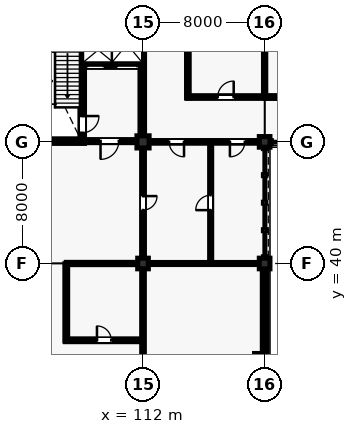
"""IFC4 building model, lengths in metres.
Left out: names, types, materials, properties, quantities, classifications, styles, units other than length and angle.
Written with IfcOpenShell. Run it as: python <this file> out.ifc"""

import sys

from ifc_helpers import new_model, si_unit, direction, frame, frame_2d, origin, origin_2d, place, context, subcontext, project, spatial, rectangle, extrude, element, fill, save


model = new_model("IFC4")
c1 = context("Model", 3, precision=1e-05, world=origin(), true_north=direction((0.0, 1.0)))
c2 = subcontext(c1, "Body", "Model", "MODEL_VIEW")
j1 = project(units=[si_unit("LENGTHUNIT", "METRE"), si_unit("PLANEANGLEUNIT", "RADIAN")], contexts=[c1])
p1 = place(None, origin())
s1 = spatial("IfcSite", under=j1, at=p1, CompositionType="ELEMENT")
p2 = place(p1, origin())
s2 = spatial("IfcBuilding", under=s1, at=p2, CompositionType="ELEMENT")
p3 = place(p2, origin())
s3 = spatial("IfcBuildingStorey", under=s2, at=p3, CompositionType="ELEMENT", Elevation=0.0)
p4 = place(p3, frame((112.0, 40.0, 0.0), z_axis=(0.0, 0.0, 1.0), x_axis=(1.0, 0.0, 0.0)))
e1 = element("IfcColumn", 1, at=p4, inside=s3, PredefinedType="COLUMN", context=c2, shape_type="SweptSolid", body=[
    extrude(rectangle(XDim=0.7, YDim=0.7, at=origin_2d()), origin(), (0.0, 0.0, 1.0), 5.28),
])
p5 = place(p3, frame((112.0, 48.0, 0.0), z_axis=(0.0, 0.0, 1.0), x_axis=(1.0, 0.0, 0.0)))
e2 = element("IfcColumn", 2, at=p5, inside=s3, PredefinedType="COLUMN", context=c2, shape_type="SweptSolid", body=[
    extrude(rectangle(XDim=0.8, YDim=0.8, at=origin_2d()), origin(), (0.0, 0.0, 1.0), 5.28),
])
for number, where, z_axis, x_axis in (
    (3, (120.0, 40.0, 0.0), (0.0, 0.0, 1.0), (1.0, 0.0, 0.0)),
    (4, (120.0, 48.0, 0.0), (0.0, 0.0, 1.0), (1.0, 0.0, 0.0)),
):
    element("IfcColumn", number, at=place(p3, frame(where, z_axis=z_axis, x_axis=x_axis)), inside=s3, PredefinedType="COLUMN", context=c2, shape_type="SweptSolid", body=[
        extrude(rectangle(XDim=0.7, YDim=0.7, at=origin_2d()), origin(), (0.0, 0.0, 1.0), 5.28),
    ])
p6 = place(p3, frame((119.636, 33.779, 0.0), z_axis=(0.0, 0.0, 1.0), x_axis=(1.0, 0.0, 0.0)))
e5 = element("IfcColumn", 5, at=p6, inside=s3, PredefinedType="COLUMN", context=c2, shape_type="SweptSolid", body=[
    extrude(rectangle(XDim=0.6, YDim=0.6, at=origin_2d()), origin(), (0.0, 0.0, 1.0), 5.28),
])
p7 = place(p3, frame((120.0, 33.854, 0.0), z_axis=(0.0, 0.0, 1.0), x_axis=(0.0, 1.0, 0.0)))
e6 = element("IfcWall", 6, at=p7, inside=s3, PredefinedType="SOLIDWALL", context=c2, shape_type="SweptSolid", body=[
    extrude(rectangle(XDim=5.811, YDim=0.305, at=frame_2d((2.905, 0.0))), origin(), (0.0, 0.0, 1.0), 5.035),
])
p8 = place(p7, frame((1.98, 0.0, 0.9)))
e7 = element("IfcOpeningElement", 7, at=p8, cuts=e6, PredefinedType="OPENING", context=c2, shape_type="SweptSolid", body=[
    extrude(rectangle(XDim=1.85, YDim=2.65, at=frame_2d((0.925, 1.325))), frame((0.0, 0.162, 0.0), z_axis=(0.0, -1.0, 0.0), x_axis=(1.0, 0.0, 0.0)), (0.0, 0.0, 1.0), 0.325),
])
p9 = place(p3, frame((111.95, 48.29, 0.0), z_axis=(0.0, 0.0, 1.0), x_axis=(0.0, 1.0, 0.0)))
e8 = element("IfcWall", 8, at=p9, inside=s3, PredefinedType="SHEAR", context=c2, shape_type="SweptSolid", body=[
    extrude(rectangle(XDim=7.42, YDim=0.3, at=frame_2d((3.71, 0.0))), origin(), (0.0, 0.0, 1.0), 5.035),
])
p10 = place(p3, frame((104.315, 48.05, 0.0), z_axis=(0.0, 0.0, 1.0), x_axis=(1.0, 0.0, 0.0)))
e9 = element("IfcWall", 9, at=p10, inside=s3, PredefinedType="SHEAR", context=c2, shape_type="SweptSolid", body=[
    extrude(rectangle(XDim=3.835, YDim=0.3, at=frame_2d((1.917, 0.0))), origin(), (0.0, 0.0, 1.0), 5.035),
])
p11 = place(p3, frame((108.0, 48.05, 0.0), z_axis=(0.0, 0.0, 1.0), x_axis=(0.0, 1.0, 0.0)))
e10 = element("IfcWall", 10, at=p11, inside=s3, PredefinedType="SHEAR", context=c2, shape_type="SweptSolid", body=[
    extrude(rectangle(XDim=7.9, YDim=0.3, at=frame_2d((3.95, 0.0))), origin(), (0.0, 0.0, 1.0), 5.035),
])
p12 = place(p11, frame((0.55, 0.0, 0.0)))
e11 = element("IfcOpeningElement", 11, at=p12, cuts=e10, PredefinedType="OPENING", context=c2, shape_type="SweptSolid", body=[
    extrude(rectangle(XDim=1.1, YDim=2.15, at=frame_2d((0.55, 1.075))), frame((0.0, 0.16, 0.0), z_axis=(0.0, -1.0, 0.0), x_axis=(1.0, 0.0, 0.0)), (0.0, 0.0, 1.0), 0.32),
])
p13 = place(p3, frame((108.0, 53.05, 0.0), z_axis=(0.0, 0.0, 1.0), x_axis=(1.0, 0.0, 0.0)))
e12 = element("IfcWall", 12, at=p13, inside=s3, PredefinedType="SHEAR", context=c2, shape_type="SweptSolid", body=[
    extrude(rectangle(XDim=3.95, YDim=0.3, at=frame_2d((1.975, 0.0))), origin(), (0.0, 0.0, 1.0), 5.035),
])
p14 = place(p13, frame((0.32, 0.0, 0.0)))
e13 = element("IfcOpeningElement", 13, at=p14, cuts=e12, PredefinedType="OPENING", context=c2, shape_type="SweptSolid", body=[
    extrude(rectangle(XDim=1.1, YDim=2.2, at=frame_2d((0.55, 1.1))), frame((0.0, 0.16, 0.0), z_axis=(0.0, -1.0, 0.0), x_axis=(1.0, 0.0, 0.0)), (0.0, 0.0, 1.0), 0.32),
])
p15 = place(p13, frame((2.28, 0.0, 0.0)))
e14 = element("IfcOpeningElement", 14, at=p15, cuts=e12, PredefinedType="OPENING", context=c2, shape_type="SweptSolid", body=[
    extrude(rectangle(XDim=1.35, YDim=2.3, at=frame_2d((0.675, 1.15))), frame((0.0, 0.16, 0.0), z_axis=(0.0, -1.0, 0.0), x_axis=(1.0, 0.0, 0.0)), (0.0, 0.0, 1.0), 0.32),
])
p16 = place(p3, frame((109.98, 53.05, 0.0), z_axis=(0.0, 0.0, 1.0), x_axis=(0.0, 1.0, 0.0)))
e15 = element("IfcWall", 15, at=p16, inside=s3, PredefinedType="SHEAR", context=c2, shape_type="SweptSolid", body=[
    extrude(rectangle(XDim=2.9, YDim=0.3, at=frame_2d((1.45, 0.0))), origin(), (0.0, 0.0, 1.0), 5.035),
])
p17 = place(p3, frame((108.0, 48.05, 0.0), z_axis=(0.0, 0.0, 1.0), x_axis=(1.0, 0.0, 0.0)))
e16 = element("IfcWall", 16, at=p17, inside=s3, PredefinedType="PARTITIONING", context=c2, shape_type="SweptSolid", body=[
    extrude(rectangle(XDim=3.61, YDim=0.2, at=frame_2d((1.805, 0.0))), origin(), (0.0, 0.0, 1.0), 4.404),
])
p18 = place(p17, frame((1.205, 0.0, 0.0)))
e17 = element("IfcOpeningElement", 17, at=p18, cuts=e16, PredefinedType="OPENING", context=c2, shape_type="SweptSolid", body=[
    extrude(rectangle(XDim=1.2, YDim=2.15, at=frame_2d((0.6, 1.075))), frame((0.0, 0.11, 0.0), z_axis=(0.0, -1.0, 0.0), x_axis=(1.0, 0.0, 0.0)), (0.0, 0.0, 1.0), 0.22),
])
p19 = place(p3, frame((106.9, 34.95, 0.0), z_axis=(0.0, 0.0, 1.0), x_axis=(1.0, 0.0, 0.0)))
e18 = element("IfcWall", 18, at=p19, inside=s3, PredefinedType="PARTITIONING", context=c2, shape_type="SweptSolid", body=[
    extrude(rectangle(XDim=5.08, YDim=0.185, at=frame_2d((2.54, 0.0))), origin(), (0.0, 0.0, 1.0), 4.404),
])
p20 = place(p19, frame((2.07, 0.0, 0.0)))
e19 = element("IfcOpeningElement", 19, at=p20, cuts=e18, PredefinedType="OPENING", context=c2, shape_type="SweptSolid", body=[
    extrude(rectangle(XDim=0.94, YDim=2.12, at=frame_2d((0.47, 1.06))), frame((0.0, 0.103, 0.0), z_axis=(0.0, -1.0, 0.0), x_axis=(1.0, 0.0, 0.0)), (0.0, 0.0, 1.0), 0.205),
])
p21 = place(p3, frame((106.95, 34.9, 0.0), z_axis=(0.0, 0.0, 1.0), x_axis=(0.0, 1.0, 0.0)))
e20 = element("IfcWall", 20, at=p21, inside=s3, PredefinedType="PARTITIONING", context=c2, shape_type="SweptSolid", body=[
    extrude(rectangle(XDim=5.08, YDim=0.185, at=frame_2d((2.54, 0.0))), origin(), (0.0, 0.0, 1.0), 4.336),
])
p22 = place(p3, frame((106.95, 40.0, 0.0), z_axis=(0.0, 0.0, 1.0), x_axis=(1.0, 0.0, 0.0)))
e21 = element("IfcWall", 21, at=p22, inside=s3, PredefinedType="PARTITIONING", context=c2, shape_type="SweptSolid", body=[
    extrude(rectangle(XDim=4.69, YDim=0.15, at=frame_2d((2.345, 0.0))), origin(), (0.0, 0.0, 1.0), 4.336),
])
p23 = place(p3, frame((114.9, 50.95, 0.0), z_axis=(0.0, 0.0, 1.0), x_axis=(1.0, 0.0, 0.0)))
e22 = element("IfcWall", 22, at=p23, inside=s3, PredefinedType="PARTITIONING", context=c2, shape_type="SweptSolid", body=[
    extrude(rectangle(XDim=5.08, YDim=0.175, at=frame_2d((2.54, 0.0))), origin(), (0.0, 0.0, 1.0), 4.412),
])
p24 = place(p23, frame((2.015, 0.0, 0.0)))
e23 = element("IfcOpeningElement", 23, at=p24, cuts=e22, PredefinedType="OPENING", context=c2, shape_type="SweptSolid", body=[
    extrude(rectangle(XDim=1.05, YDim=2.15, at=frame_2d((0.525, 1.075))), frame((0.0, 0.097, 0.0), z_axis=(0.0, -1.0, 0.0), x_axis=(1.0, 0.0, 0.0)), (0.0, 0.0, 1.0), 0.195),
])
p25 = place(p3, frame((114.95, 50.9, 0.0), z_axis=(0.0, 0.0, 1.0), x_axis=(0.0, 1.0, 0.0)))
e24 = element("IfcWall", 24, at=p25, inside=s3, PredefinedType="PARTITIONING", context=c2, shape_type="SweptSolid", body=[
    extrude(rectangle(XDim=5.08, YDim=0.175, at=frame_2d((2.54, 0.0))), origin(), (0.0, 0.0, 1.0), 4.403),
])
p26 = place(p3, frame((120.0, 50.95, 0.0), z_axis=(0.0, 0.0, 1.0), x_axis=(0.0, 1.0, 0.0)))
e25 = element("IfcWall", 25, at=p26, inside=s3, PredefinedType="PARTITIONING", context=c2, shape_type="SweptSolid", body=[
    extrude(rectangle(XDim=4.69, YDim=0.15, at=frame_2d((2.345, 0.0))), origin(), (0.0, 0.0, 1.0), 4.412),
])
p27 = place(p3, frame((120.02, 50.95, 0.0), z_axis=(0.0, 0.0, 1.0), x_axis=(1.0, 0.0, 0.0)))
e26 = element("IfcWall", 26, at=p27, inside=s3, PredefinedType="PARTITIONING", context=c2, shape_type="SweptSolid", body=[
    extrude(rectangle(XDim=7.96, YDim=0.185, at=frame_2d((3.98, 0.0))), origin(), (0.0, 0.0, 1.0), 4.404),
])
p28 = place(p27, frame((3.47, 0.0, 0.0)))
e27 = element("IfcOpeningElement", 27, at=p28, cuts=e26, PredefinedType="OPENING", context=c2, shape_type="SweptSolid", body=[
    extrude(rectangle(XDim=1.02, YDim=2.2, at=frame_2d((0.51, 1.1))), frame((0.0, 0.103, 0.0), z_axis=(0.0, -1.0, 0.0), x_axis=(1.0, 0.0, 0.0)), (0.0, 0.0, 1.0), 0.205),
])
p29 = place(p3, frame((112.0, 32.34, 0.0), z_axis=(0.0, 0.0, 1.0), x_axis=(0.0, 1.0, 0.0)))
e28 = element("IfcWall", 28, at=p29, inside=s3, PredefinedType="PARTITIONING", context=c2, shape_type="SweptSolid", body=[
    extrude(rectangle(XDim=7.32, YDim=0.175, at=frame_2d((3.66, 0.0))), origin(), (0.0, 0.0, 1.0), 4.404),
])
p30 = place(p29, frame((0.52, 0.0, 0.0)))
e29 = element("IfcOpeningElement", 29, at=p30, cuts=e28, PredefinedType="OPENING", context=c2, shape_type="SweptSolid", body=[
    extrude(rectangle(XDim=0.94, YDim=2.12, at=frame_2d((0.47, 1.06))), frame((0.0, 0.097, 0.0), z_axis=(0.0, -1.0, 0.0), x_axis=(1.0, 0.0, 0.0)), (0.0, 0.0, 1.0), 0.195),
])
p31 = place(p3, frame((112.0, 40.34, 0.0), z_axis=(0.0, 0.0, 1.0), x_axis=(0.0, 1.0, 0.0)))
e30 = element("IfcWall", 30, at=p31, inside=s3, PredefinedType="PARTITIONING", context=c2, shape_type="SweptSolid", body=[
    extrude(rectangle(XDim=7.27, YDim=0.185, at=frame_2d((3.635, 0.0))), origin(), (0.0, 0.0, 1.0), 4.471),
])
p32 = place(p31, frame((3.175, 0.0, 0.0)))
e31 = element("IfcOpeningElement", 31, at=p32, cuts=e30, PredefinedType="OPENING", context=c2, shape_type="SweptSolid", body=[
    extrude(rectangle(XDim=0.92, YDim=2.1, at=frame_2d((0.46, 1.05))), frame((0.0, 0.103, 0.0), z_axis=(0.0, -1.0, 0.0), x_axis=(1.0, 0.0, 0.0)), (0.0, 0.0, 1.0), 0.205),
])
p33 = place(p3, frame((112.34, 40.0, 0.0), z_axis=(0.0, 0.0, 1.0), x_axis=(1.0, 0.0, 0.0)))
e32 = element("IfcWall", 32, at=p33, inside=s3, PredefinedType="PARTITIONING", context=c2, shape_type="SweptSolid", body=[
    extrude(rectangle(XDim=7.32, YDim=0.135, at=frame_2d((3.66, 0.0))), origin(), (0.0, 0.0, 1.0), 4.404),
])
p34 = place(p3, frame((112.39, 48.0, 0.0), z_axis=(0.0, 0.0, 1.0), x_axis=(1.0, 0.0, 0.0)))
e33 = element("IfcWall", 33, at=p34, inside=s3, PredefinedType="PARTITIONING", context=c2, shape_type="SweptSolid", body=[
    extrude(rectangle(XDim=7.27, YDim=0.175, at=frame_2d((3.635, 0.0))), origin(), (0.0, 0.0, 1.0), 4.327),
])
p35 = place(p34, frame((1.327, 0.0, 0.0)))
e34 = element("IfcOpeningElement", 34, at=p35, cuts=e33, PredefinedType="OPENING", context=c2, shape_type="SweptSolid", body=[
    extrude(rectangle(XDim=0.98, YDim=2.15, at=frame_2d((0.49, 1.075))), frame((0.0, 0.097, 0.0), z_axis=(0.0, -1.0, 0.0), x_axis=(1.0, 0.0, 0.0)), (0.0, 0.0, 1.0), 0.195),
])
p36 = place(p34, frame((5.326, 0.0, 0.0)))
e35 = element("IfcOpeningElement", 35, at=p36, cuts=e33, PredefinedType="OPENING", context=c2, shape_type="SweptSolid", body=[
    extrude(rectangle(XDim=0.98, YDim=2.15, at=frame_2d((0.49, 1.075))), frame((0.0, 0.097, 0.0), z_axis=(0.0, -1.0, 0.0), x_axis=(1.0, 0.0, 0.0)), (0.0, 0.0, 1.0), 0.195),
])
p37 = place(p3, frame((116.45, 40.02, 0.0), z_axis=(0.0, 0.0, 1.0), x_axis=(0.0, 1.0, 0.0)))
e36 = element("IfcWall", 36, at=p37, inside=s3, PredefinedType="PARTITIONING", context=c2, shape_type="SweptSolid", body=[
    extrude(rectangle(XDim=7.96, YDim=0.135, at=frame_2d((3.98, 0.0))), origin(), (0.0, 0.0, 1.0), 4.327),
])
p38 = place(p37, frame((3.49, 0.0, 0.0)))
e37 = element("IfcOpeningElement", 37, at=p38, cuts=e36, PredefinedType="OPENING", context=c2, shape_type="SweptSolid", body=[
    extrude(rectangle(XDim=0.98, YDim=2.15, at=frame_2d((0.49, 1.075))), frame((0.0, 0.077, 0.0), z_axis=(0.0, -1.0, 0.0), x_axis=(1.0, 0.0, 0.0)), (0.0, 0.0, 1.0), 0.155),
])
p39 = place(p8, origin())
e38 = element("IfcWindow", 38, at=p39, inside=s3, PartitioningType="SINGLE_PANEL", PredefinedType="WINDOW", context=c2, shape_type="SweptSolid", body=[
    extrude(rectangle(XDim=1.85, YDim=2.65, at=frame_2d((0.925, 1.325))), frame((0.0, 0.03, 0.0), z_axis=(0.0, -1.0, 0.0), x_axis=(1.0, 0.0, 0.0)), (0.0, 0.0, 1.0), 0.06),
])
fill(e7, e38)
p40 = place(p12, frame((1.1, 0.0, 0.0), z_axis=(0.0, 0.0, 1.0), x_axis=(-1.0, 0.0, 0.0)))
e39 = element("IfcDoor", 39, at=p40, inside=s3, OperationType="SINGLE_SWING_RIGHT", PredefinedType="DOOR", context=c2, shape_type="SweptSolid", body=[
    extrude(rectangle(XDim=1.1, YDim=2.15, at=frame_2d((0.55, 1.075))), frame((0.0, 0.025, 0.0), z_axis=(0.0, -1.0, 0.0), x_axis=(1.0, 0.0, 0.0)), (0.0, 0.0, 1.0), 0.05),
])
fill(e11, e39)
p41 = place(p14, origin())
e40 = element("IfcDoor", 40, at=p41, inside=s3, OperationType="SLIDING_TO_LEFT", PredefinedType="DOOR", context=c2, shape_type="SweptSolid", body=[
    extrude(rectangle(XDim=1.1, YDim=2.2, at=frame_2d((0.55, 1.1))), frame((0.0, 0.025, 0.0), z_axis=(0.0, -1.0, 0.0), x_axis=(1.0, 0.0, 0.0)), (0.0, 0.0, 1.0), 0.05),
])
fill(e13, e40)
p42 = place(p15, origin())
e41 = element("IfcDoor", 41, at=p42, inside=s3, OperationType="DOUBLE_DOOR_SLIDING", PredefinedType="DOOR", context=c2, shape_type="SweptSolid", body=[
    extrude(rectangle(XDim=1.35, YDim=2.3, at=frame_2d((0.675, 1.15))), frame((0.0, 0.025, 0.0), z_axis=(0.0, -1.0, 0.0), x_axis=(1.0, 0.0, 0.0)), (0.0, 0.0, 1.0), 0.05),
])
fill(e14, e41)
p43 = place(p18, frame((1.2, 0.0, 0.0), z_axis=(0.0, 0.0, 1.0), x_axis=(-1.0, 0.0, 0.0)))
e42 = element("IfcDoor", 42, at=p43, inside=s3, OperationType="SINGLE_SWING_LEFT", PredefinedType="DOOR", context=c2, shape_type="SweptSolid", body=[
    extrude(rectangle(XDim=1.2, YDim=2.15, at=frame_2d((0.6, 1.075))), frame((0.0, 0.025, 0.0), z_axis=(0.0, -1.0, 0.0), x_axis=(1.0, 0.0, 0.0)), (0.0, 0.0, 1.0), 0.05),
])
fill(e17, e42)
p44 = place(p20, origin())
e43 = element("IfcDoor", 43, at=p44, inside=s3, OperationType="SINGLE_SWING_LEFT", PredefinedType="DOOR", context=c2, shape_type="SweptSolid", body=[
    extrude(rectangle(XDim=0.94, YDim=2.12, at=frame_2d((0.47, 1.06))), frame((0.0, 0.025, 0.0), z_axis=(0.0, -1.0, 0.0), x_axis=(1.0, 0.0, 0.0)), (0.0, 0.0, 1.0), 0.05),
])
fill(e19, e43)
p45 = place(p24, origin())
e44 = element("IfcDoor", 44, at=p45, inside=s3, OperationType="SINGLE_SWING_RIGHT", PredefinedType="DOOR", context=c2, shape_type="SweptSolid", body=[
    extrude(rectangle(XDim=1.05, YDim=2.15, at=frame_2d((0.525, 1.075))), frame((0.0, 0.025, 0.0), z_axis=(0.0, -1.0, 0.0), x_axis=(1.0, 0.0, 0.0)), (0.0, 0.0, 1.0), 0.05),
])
fill(e23, e44)
p46 = place(p32, frame((0.92, 0.0, 0.0), z_axis=(0.0, 0.0, 1.0), x_axis=(-1.0, 0.0, 0.0)))
e45 = element("IfcDoor", 45, at=p46, inside=s3, OperationType="SINGLE_SWING_RIGHT", PredefinedType="DOOR", context=c2, shape_type="SweptSolid", body=[
    extrude(rectangle(XDim=0.92, YDim=2.1, at=frame_2d((0.46, 1.05))), frame((0.0, 0.025, 0.0), z_axis=(0.0, -1.0, 0.0), x_axis=(1.0, 0.0, 0.0)), (0.0, 0.0, 1.0), 0.05),
])
fill(e31, e45)
p47 = place(p35, frame((0.98, 0.0, 0.0), z_axis=(0.0, 0.0, 1.0), x_axis=(-1.0, 0.0, 0.0)))
e46 = element("IfcDoor", 46, at=p47, inside=s3, OperationType="SINGLE_SWING_RIGHT", PredefinedType="DOOR", context=c2, shape_type="SweptSolid", body=[
    extrude(rectangle(XDim=0.98, YDim=2.15, at=frame_2d((0.49, 1.075))), frame((0.0, 0.025, 0.0), z_axis=(0.0, -1.0, 0.0), x_axis=(1.0, 0.0, 0.0)), (0.0, 0.0, 1.0), 0.05),
])
fill(e34, e46)
p48 = place(p36, frame((0.98, 0.0, 0.0), z_axis=(0.0, 0.0, 1.0), x_axis=(-1.0, 0.0, 0.0)))
e47 = element("IfcDoor", 47, at=p48, inside=s3, OperationType="SINGLE_SWING_LEFT", PredefinedType="DOOR", context=c2, shape_type="SweptSolid", body=[
    extrude(rectangle(XDim=0.98, YDim=2.15, at=frame_2d((0.49, 1.075))), frame((0.0, 0.025, 0.0), z_axis=(0.0, -1.0, 0.0), x_axis=(1.0, 0.0, 0.0)), (0.0, 0.0, 1.0), 0.05),
])
fill(e35, e47)
p49 = place(p38, origin())
e48 = element("IfcDoor", 48, at=p49, inside=s3, OperationType="SINGLE_SWING_LEFT", PredefinedType="DOOR", context=c2, shape_type="SweptSolid", body=[
    extrude(rectangle(XDim=0.98, YDim=2.15, at=frame_2d((0.49, 1.075))), frame((0.0, 0.025, 0.0), z_axis=(0.0, -1.0, 0.0), x_axis=(1.0, 0.0, 0.0)), (0.0, 0.0, 1.0), 0.05),
])
fill(e37, e48)
save(model, sys.argv[1])
